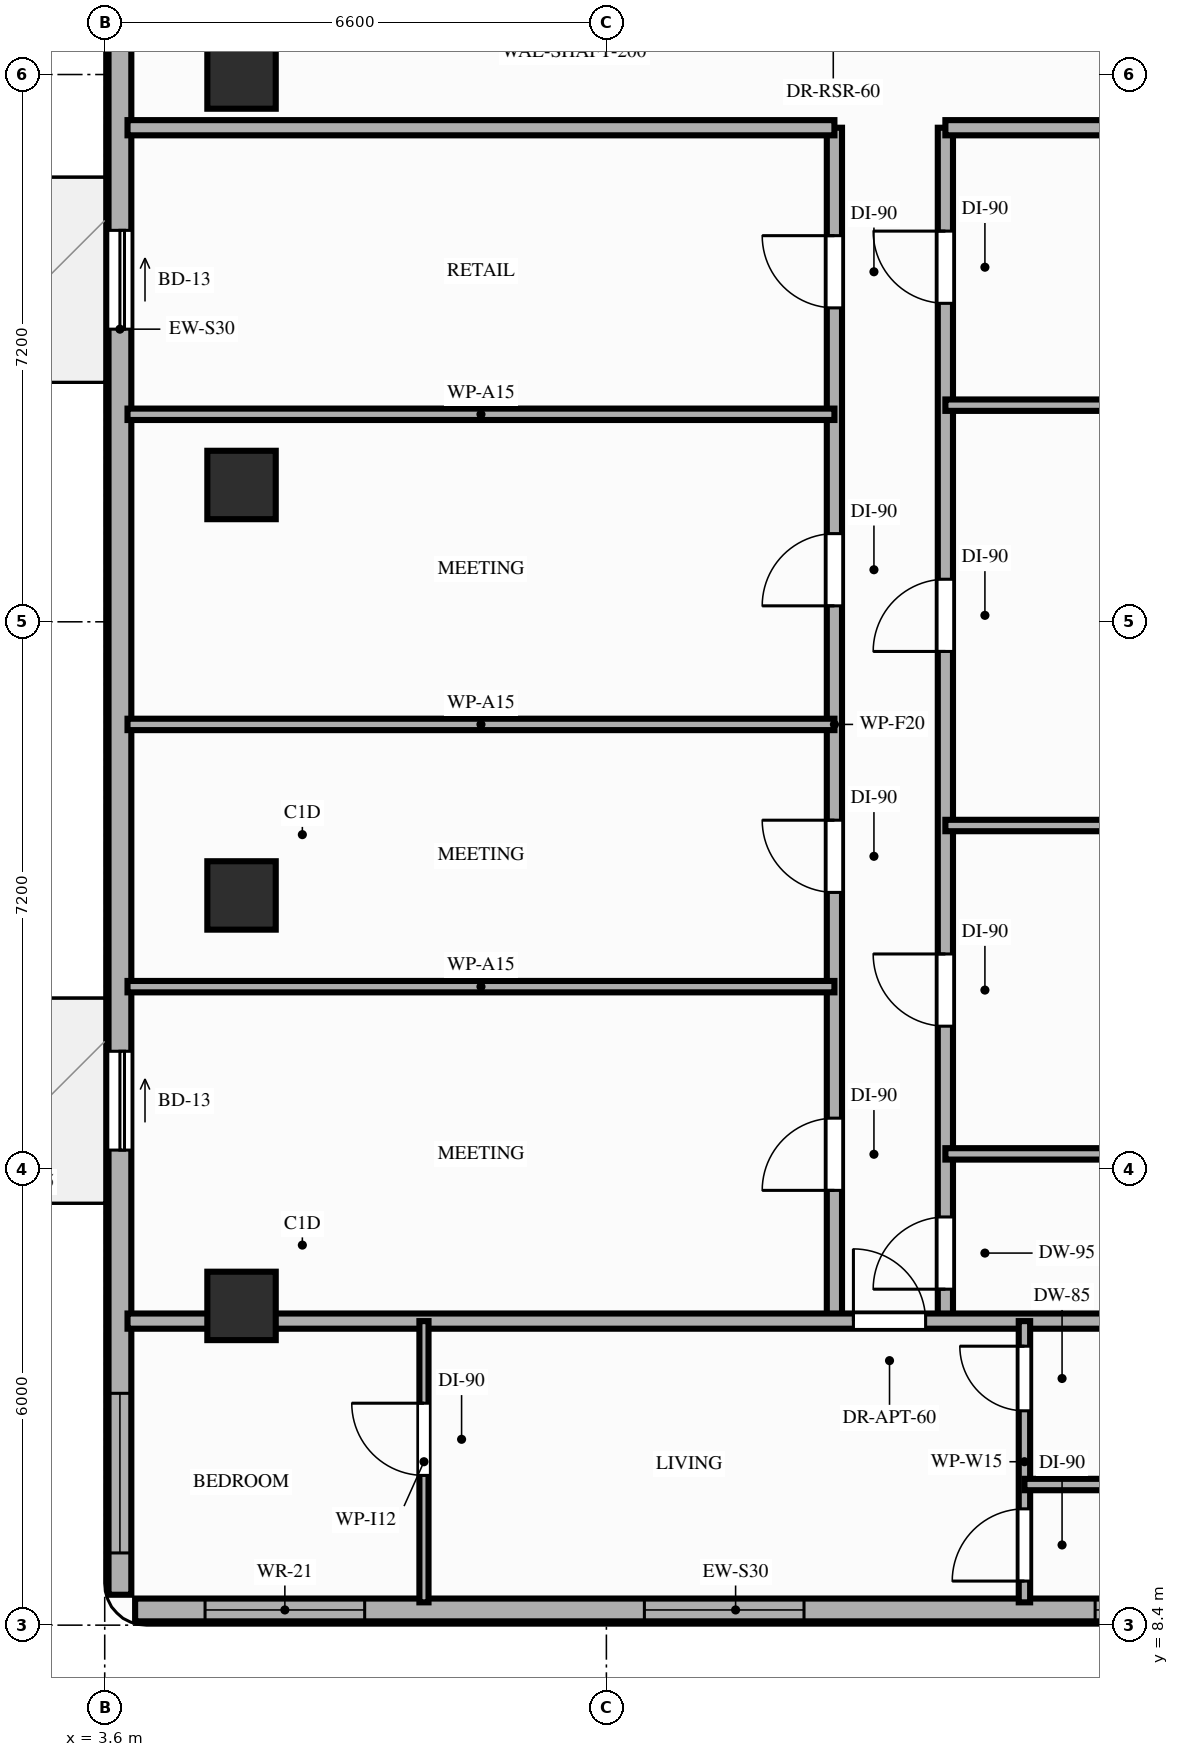
"""IFC4 building model, lengths in metres.
Left out: names, types, materials, properties, quantities, classifications, styles, units other than length and angle.
Written with IfcOpenShell. Run it as: python <this file> out.ifc"""

import sys

from ifc_helpers import new_model, si_unit, direction, frame, frame_2d, origin, origin_2d, place, context, subcontext, project, spatial, rectangle, extrude, element, fill, save


model = new_model("IFC4")
c1 = context("Model", 3, precision=1e-05, world=origin(), true_north=direction((0.0, 1.0)))
c2 = subcontext(c1, "Body", "Model", "MODEL_VIEW")
j1 = project(units=[si_unit("LENGTHUNIT", "METRE"), si_unit("PLANEANGLEUNIT", "RADIAN")], contexts=[c1])
p1 = place(None, origin())
s1 = spatial("IfcSite", under=j1, at=p1, CompositionType="ELEMENT")
p2 = place(p1, origin())
s2 = spatial("IfcBuilding", under=s1, at=p2, CompositionType="ELEMENT")
p3 = place(p2, frame((0.0, 0.0, 188.8)))
s3 = spatial("IfcBuildingStorey", under=s2, at=p3, CompositionType="ELEMENT", Elevation=188.8)
for number, where, z_axis, x_axis in (
    (1, (5.4, 12.6, 0.0), (0.0, 0.0, 1.0), (1.0, 0.0, 0.0)),
    (2, (5.4, 18.0, 0.0), (0.0, 0.0, 1.0), (1.0, 0.0, 0.0)),
    (3, (5.4, 23.4, 0.0), (0.0, 0.0, 1.0), (1.0, 0.0, 0.0)),
    (4, (5.4, 28.8, 0.0), (0.0, 0.0, 1.0), (1.0, 0.0, 0.0)),
):
    element("IfcColumn", number, at=place(p3, frame(where, z_axis=z_axis, x_axis=x_axis)), inside=s3, PredefinedType="COLUMN", context=c2, shape_type="SweptSolid", body=[
        extrude(rectangle(XDim=0.9, YDim=0.9, at=origin_2d()), origin(), (0.0, 0.0, 1.0), 3.2),
    ])
p4 = place(p3, frame((4.0, 8.6, 0.0), z_axis=(0.0, 0.0, 1.0), x_axis=(1.0, 0.0, 0.0)))
e5 = element("IfcWall", 5, at=p4, inside=s3, PredefinedType="STANDARD", context=c2, shape_type="SweptSolid", body=[
    extrude(rectangle(XDim=15.8, YDim=0.3, at=frame_2d((7.9, 0.0))), origin(), (0.0, 0.0, 1.0), 3.02),
])
p5 = place(p4, frame((0.92, 0.0, 0.85)))
e6 = element("IfcOpeningElement", 6, at=p5, cuts=e5, PredefinedType="OPENING", context=c2, shape_type="SweptSolid", body=[
    extrude(rectangle(XDim=2.1, YDim=1.8, at=frame_2d((1.05, 0.9))), frame((0.0, 0.16, 0.0), z_axis=(0.0, -1.0, 0.0), x_axis=(1.0, 0.0, 0.0)), (0.0, 0.0, 1.0), 0.32),
])
p6 = place(p4, frame((6.7, 0.0, 0.85)))
e7 = element("IfcOpeningElement", 7, at=p6, cuts=e5, PredefinedType="OPENING", context=c2, shape_type="SweptSolid", body=[
    extrude(rectangle(XDim=2.1, YDim=1.8, at=frame_2d((1.05, 0.9))), frame((0.0, 0.16, 0.0), z_axis=(0.0, -1.0, 0.0), x_axis=(1.0, 0.0, 0.0)), (0.0, 0.0, 1.0), 0.32),
])
p7 = place(p4, frame((12.63, 0.0, 0.85)))
e8 = element("IfcOpeningElement", 8, at=p7, cuts=e5, PredefinedType="OPENING", context=c2, shape_type="SweptSolid", body=[
    extrude(rectangle(XDim=2.1, YDim=1.8, at=frame_2d((1.05, 0.9))), frame((0.0, 0.16, 0.0), z_axis=(0.0, -1.0, 0.0), x_axis=(1.0, 0.0, 0.0)), (0.0, 0.0, 1.0), 0.32),
])
p8 = place(p3, frame((3.8, 42.1, 0.0), z_axis=(0.0, 0.0, 1.0), x_axis=(0.0, -1.0, 0.0)))
e9 = element("IfcWall", 9, at=p8, inside=s3, PredefinedType="STANDARD", context=c2, shape_type="SweptSolid", body=[
    extrude(rectangle(XDim=33.3, YDim=0.3, at=frame_2d((16.65, 0.0))), origin(), (0.0, 0.0, 1.0), 2.71),
])
p9 = place(p8, frame((26.15, 0.0, 0.0)))
e10 = element("IfcOpeningElement", 10, at=p9, cuts=e9, PredefinedType="OPENING", context=c2, shape_type="SweptSolid", body=[
    extrude(rectangle(XDim=1.3, YDim=2.08, at=frame_2d((0.65, 1.04))), frame((0.0, 0.16, 0.0), z_axis=(0.0, -1.0, 0.0), x_axis=(1.0, 0.0, 0.0)), (0.0, 0.0, 1.0), 0.32),
])
p10 = place(p8, frame((15.35, 0.0, 0.0)))
e11 = element("IfcOpeningElement", 11, at=p10, cuts=e9, PredefinedType="OPENING", context=c2, shape_type="SweptSolid", body=[
    extrude(rectangle(XDim=1.3, YDim=2.08, at=frame_2d((0.65, 1.04))), frame((0.0, 0.16, 0.0), z_axis=(0.0, -1.0, 0.0), x_axis=(1.0, 0.0, 0.0)), (0.0, 0.0, 1.0), 0.32),
])
p11 = place(p8, frame((30.65, 0.0, 0.85)))
e12 = element("IfcOpeningElement", 12, at=p11, cuts=e9, PredefinedType="OPENING", context=c2, shape_type="SweptSolid", body=[
    extrude(rectangle(XDim=2.1, YDim=1.61, at=frame_2d((1.05, 0.805))), frame((0.0, 0.16, 0.0), z_axis=(0.0, -1.0, 0.0), x_axis=(1.0, 0.0, 0.0)), (0.0, 0.0, 1.0), 0.32),
])
p12 = place(p8, frame((9.75, 0.0, 0.85)))
e13 = element("IfcOpeningElement", 13, at=p12, cuts=e9, PredefinedType="OPENING", context=c2, shape_type="SweptSolid", body=[
    extrude(rectangle(XDim=2.1, YDim=1.61, at=frame_2d((1.05, 0.805))), frame((0.0, 0.16, 0.0), z_axis=(0.0, -1.0, 0.0), x_axis=(1.0, 0.0, 0.0)), (0.0, 0.0, 1.0), 0.32),
])
p13 = place(p8, frame((3.65, 0.0, 0.85)))
e14 = element("IfcOpeningElement", 14, at=p13, cuts=e9, PredefinedType="OPENING", context=c2, shape_type="SweptSolid", body=[
    extrude(rectangle(XDim=2.1, YDim=1.61, at=frame_2d((1.05, 0.805))), frame((0.0, 0.16, 0.0), z_axis=(0.0, -1.0, 0.0), x_axis=(1.0, 0.0, 0.0)), (0.0, 0.0, 1.0), 0.32),
])
p14 = place(p3, frame((13.2, 12.4, 0.0), z_axis=(0.0, 0.0, 1.0), x_axis=(0.0, 1.0, 0.0)))
e15 = element("IfcWall", 15, at=p14, inside=s3, PredefinedType="PARTITIONING", context=c2, shape_type="SweptSolid", body=[
    extrude(rectangle(XDim=15.7, YDim=0.2, at=frame_2d((7.85, 0.0))), origin(), (0.0, 0.0, 1.0), 2.51),
])
p15 = place(p14, frame((1.72, 0.0, 0.0)))
e16 = element("IfcOpeningElement", 16, at=p15, cuts=e15, PredefinedType="OPENING", context=c2, shape_type="SweptSolid", body=[
    extrude(rectangle(XDim=0.95, YDim=2.15, at=frame_2d((0.475, 1.075))), frame((0.0, 0.11, 0.0), z_axis=(0.0, -1.0, 0.0), x_axis=(1.0, 0.0, 0.0)), (0.0, 0.0, 1.0), 0.22),
])
p16 = place(p14, frame((5.64, 0.0, 0.0)))
e17 = element("IfcOpeningElement", 17, at=p16, cuts=e15, PredefinedType="OPENING", context=c2, shape_type="SweptSolid", body=[
    extrude(rectangle(XDim=0.95, YDim=2.15, at=frame_2d((0.475, 1.075))), frame((0.0, 0.11, 0.0), z_axis=(0.0, -1.0, 0.0), x_axis=(1.0, 0.0, 0.0)), (0.0, 0.0, 1.0), 0.22),
])
p17 = place(p14, frame((9.41, 0.0, 0.0)))
e18 = element("IfcOpeningElement", 18, at=p17, cuts=e15, PredefinedType="OPENING", context=c2, shape_type="SweptSolid", body=[
    extrude(rectangle(XDim=0.95, YDim=2.15, at=frame_2d((0.475, 1.075))), frame((0.0, 0.11, 0.0), z_axis=(0.0, -1.0, 0.0), x_axis=(1.0, 0.0, 0.0)), (0.0, 0.0, 1.0), 0.22),
])
p18 = place(p14, frame((13.33, 0.0, 0.0)))
e19 = element("IfcOpeningElement", 19, at=p18, cuts=e15, PredefinedType="OPENING", context=c2, shape_type="SweptSolid", body=[
    extrude(rectangle(XDim=0.95, YDim=2.15, at=frame_2d((0.475, 1.075))), frame((0.0, 0.11, 0.0), z_axis=(0.0, -1.0, 0.0), x_axis=(1.0, 0.0, 0.0)), (0.0, 0.0, 1.0), 0.22),
])
p19 = place(p3, frame((14.66, 12.4, 0.0), z_axis=(0.0, 0.0, 1.0), x_axis=(0.0, 1.0, 0.0)))
e20 = element("IfcWall", 20, at=p19, inside=s3, PredefinedType="PARTITIONING", context=c2, shape_type="SweptSolid", body=[
    extrude(rectangle(XDim=15.7, YDim=0.2, at=frame_2d((7.85, 0.0))), origin(), (0.0, 0.0, 1.0), 2.51),
])
p20 = place(p19, frame((0.42, 0.0, 0.0)))
e21 = element("IfcOpeningElement", 21, at=p20, cuts=e20, PredefinedType="OPENING", context=c2, shape_type="SweptSolid", body=[
    extrude(rectangle(XDim=0.95, YDim=2.1, at=frame_2d((0.475, 1.05))), frame((0.0, 0.11, 0.0), z_axis=(0.0, -1.0, 0.0), x_axis=(1.0, 0.0, 0.0)), (0.0, 0.0, 1.0), 0.22),
])
p21 = place(p19, frame((3.88, 0.0, 0.0)))
e22 = element("IfcOpeningElement", 22, at=p21, cuts=e20, PredefinedType="OPENING", context=c2, shape_type="SweptSolid", body=[
    extrude(rectangle(XDim=0.95, YDim=2.15, at=frame_2d((0.475, 1.075))), frame((0.0, 0.11, 0.0), z_axis=(0.0, -1.0, 0.0), x_axis=(1.0, 0.0, 0.0)), (0.0, 0.0, 1.0), 0.22),
])
p22 = place(p19, frame((8.81, 0.0, 0.0)))
e23 = element("IfcOpeningElement", 23, at=p22, cuts=e20, PredefinedType="OPENING", context=c2, shape_type="SweptSolid", body=[
    extrude(rectangle(XDim=0.95, YDim=2.15, at=frame_2d((0.475, 1.075))), frame((0.0, 0.11, 0.0), z_axis=(0.0, -1.0, 0.0), x_axis=(1.0, 0.0, 0.0)), (0.0, 0.0, 1.0), 0.22),
])
p23 = place(p19, frame((13.39, 0.0, 0.0)))
e24 = element("IfcOpeningElement", 24, at=p23, cuts=e20, PredefinedType="OPENING", context=c2, shape_type="SweptSolid", body=[
    extrude(rectangle(XDim=0.95, YDim=2.15, at=frame_2d((0.475, 1.075))), frame((0.0, 0.11, 0.0), z_axis=(0.0, -1.0, 0.0), x_axis=(1.0, 0.0, 0.0)), (0.0, 0.0, 1.0), 0.22),
])
p24 = place(p3, frame((3.9, 12.4, 0.0), z_axis=(0.0, 0.0, 1.0), x_axis=(1.0, 0.0, 0.0)))
e25 = element("IfcWall", 25, at=p24, inside=s3, PredefinedType="PARTITIONING", context=c2, shape_type="SweptSolid", body=[
    extrude(rectangle(XDim=16.0, YDim=0.2, at=frame_2d((8.0, 0.0))), origin(), (0.0, 0.0, 1.0), 2.51),
])
p25 = place(p24, frame((9.55, 0.0, 0.0)))
e26 = element("IfcOpeningElement", 26, at=p25, cuts=e25, PredefinedType="OPENING", context=c2, shape_type="SweptSolid", body=[
    extrude(rectangle(XDim=0.95, YDim=2.15, at=frame_2d((0.475, 1.075))), frame((0.0, 0.11, 0.0), z_axis=(0.0, -1.0, 0.0), x_axis=(1.0, 0.0, 0.0)), (0.0, 0.0, 1.0), 0.22),
])
p26 = place(p3, frame((3.9, 28.1, 0.0), z_axis=(0.0, 0.0, 1.0), x_axis=(1.0, 0.0, 0.0)))
e27 = element("IfcWall", 27, at=p26, inside=s3, PredefinedType="PARTITIONING", context=c2, shape_type="SweptSolid", body=[
    extrude(rectangle(XDim=9.3, YDim=0.2, at=frame_2d((4.65, 0.0))), origin(), (0.0, 0.0, 1.0), 2.51),
])
p27 = place(p3, frame((14.66, 28.1, 0.0), z_axis=(0.0, 0.0, 1.0), x_axis=(1.0, 0.0, 0.0)))
e28 = element("IfcWall", 28, at=p27, inside=s3, PredefinedType="PARTITIONING", context=c2, shape_type="SweptSolid", body=[
    extrude(rectangle(XDim=5.24, YDim=0.2, at=frame_2d((2.62, 0.0))), origin(), (0.0, 0.0, 1.0), 2.51),
])
p28 = place(p3, frame((7.8, 8.7, 0.0), z_axis=(0.0, 0.0, 1.0), x_axis=(0.0, 1.0, 0.0)))
e29 = element("IfcWall", 29, at=p28, inside=s3, PredefinedType="PARTITIONING", context=c2, shape_type="SweptSolid", body=[
    extrude(rectangle(XDim=3.7, YDim=0.12, at=frame_2d((1.85, 0.0))), origin(), (0.0, 0.0, 1.0), 2.51),
])
p29 = place(p28, frame((1.67, 0.0, 0.0)))
e30 = element("IfcOpeningElement", 30, at=p29, cuts=e29, PredefinedType="OPENING", context=c2, shape_type="SweptSolid", body=[
    extrude(rectangle(XDim=0.95, YDim=2.15, at=frame_2d((0.475, 1.075))), frame((0.0, 0.07, 0.0), z_axis=(0.0, -1.0, 0.0), x_axis=(1.0, 0.0, 0.0)), (0.0, 0.0, 1.0), 0.14),
])
p30 = place(p3, frame((15.7, 8.7, 0.0), z_axis=(0.0, 0.0, 1.0), x_axis=(0.0, 1.0, 0.0)))
e31 = element("IfcWall", 31, at=p30, inside=s3, PredefinedType="PARTITIONING", context=c2, shape_type="SweptSolid", body=[
    extrude(rectangle(XDim=3.7, YDim=0.15, at=frame_2d((1.85, 0.0))), origin(), (0.0, 0.0, 1.0), 2.51),
])
p31 = place(p30, frame((0.28, 0.0, 0.0)))
e32 = element("IfcOpeningElement", 32, at=p31, cuts=e31, PredefinedType="OPENING", context=c2, shape_type="SweptSolid", body=[
    extrude(rectangle(XDim=0.95, YDim=2.15, at=frame_2d((0.475, 1.075))), frame((0.0, 0.085, 0.0), z_axis=(0.0, -1.0, 0.0), x_axis=(1.0, 0.0, 0.0)), (0.0, 0.0, 1.0), 0.17),
])
p32 = place(p30, frame((2.52, 0.0, 0.0)))
e33 = element("IfcOpeningElement", 33, at=p32, cuts=e31, PredefinedType="OPENING", context=c2, shape_type="SweptSolid", body=[
    extrude(rectangle(XDim=0.85, YDim=2.1, at=frame_2d((0.425, 1.05))), frame((0.0, 0.085, 0.0), z_axis=(0.0, -1.0, 0.0), x_axis=(1.0, 0.0, 0.0)), (0.0, 0.0, 1.0), 0.17),
])
p33 = place(p3, frame((15.7, 10.25, 0.0), z_axis=(0.0, 0.0, 1.0), x_axis=(1.0, 0.0, 0.0)))
e34 = element("IfcWall", 34, at=p33, inside=s3, PredefinedType="PARTITIONING", context=c2, shape_type="SweptSolid", body=[
    extrude(rectangle(XDim=4.2, YDim=0.15, at=frame_2d((2.1, 0.0))), origin(), (0.0, 0.0, 1.0), 3.02),
])
for number, where, z_axis, x_axis in (
    (35, (3.9, 16.8, 0.0), (0.0, 0.0, 1.0), (1.0, 0.0, 0.0)),
    (36, (3.9, 20.25, 0.0), (0.0, 0.0, 1.0), (1.0, 0.0, 0.0)),
    (37, (3.9, 24.33, 0.0), (0.0, 0.0, 1.0), (1.0, 0.0, 0.0)),
):
    element("IfcWall", number, at=place(p3, frame(where, z_axis=z_axis, x_axis=x_axis)), inside=s3, PredefinedType="PARTITIONING", context=c2, shape_type="SweptSolid", body=[
        extrude(rectangle(XDim=9.3, YDim=0.15, at=frame_2d((4.65, 0.0))), origin(), (0.0, 0.0, 1.0), 2.51),
    ])
for number, where, z_axis, x_axis in (
    (38, (14.66, 14.6, 0.0), (0.0, 0.0, 1.0), (1.0, 0.0, 0.0)),
    (39, (14.66, 18.92, 0.0), (0.0, 0.0, 1.0), (1.0, 0.0, 0.0)),
    (40, (14.66, 24.45, 0.0), (0.0, 0.0, 1.0), (1.0, 0.0, 0.0)),
):
    element("IfcWall", number, at=place(p3, frame(where, z_axis=z_axis, x_axis=x_axis)), inside=s3, PredefinedType="PARTITIONING", context=c2, shape_type="SweptSolid", body=[
        extrude(rectangle(XDim=5.24, YDim=0.15, at=frame_2d((2.62, 0.0))), origin(), (0.0, 0.0, 1.0), 2.51),
    ])
p34 = place(p9, origin())
e41 = element("IfcDoor", 41, at=p34, inside=s3, OperationType="SLIDING_TO_LEFT", PredefinedType="DOOR", context=c2, shape_type="SweptSolid", body=[
    extrude(rectangle(XDim=1.3, YDim=2.08, at=frame_2d((0.65, 1.04))), frame((0.0, 0.025, 0.0), z_axis=(0.0, -1.0, 0.0), x_axis=(1.0, 0.0, 0.0)), (0.0, 0.0, 1.0), 0.05),
])
fill(e10, e41)
p35 = place(p10, origin())
e42 = element("IfcDoor", 42, at=p35, inside=s3, OperationType="SLIDING_TO_LEFT", PredefinedType="DOOR", context=c2, shape_type="SweptSolid", body=[
    extrude(rectangle(XDim=1.3, YDim=2.08, at=frame_2d((0.65, 1.04))), frame((0.0, 0.025, 0.0), z_axis=(0.0, -1.0, 0.0), x_axis=(1.0, 0.0, 0.0)), (0.0, 0.0, 1.0), 0.05),
])
fill(e11, e42)
p36 = place(p5, origin())
e43 = element("IfcWindow", 43, at=p36, inside=s3, PartitioningType="SINGLE_PANEL", PredefinedType="WINDOW", context=c2, shape_type="SweptSolid", body=[
    extrude(rectangle(XDim=2.1, YDim=1.8, at=frame_2d((1.05, 0.9))), frame((0.0, 0.03, 0.0), z_axis=(0.0, -1.0, 0.0), x_axis=(1.0, 0.0, 0.0)), (0.0, 0.0, 1.0), 0.06),
])
fill(e6, e43)
p37 = place(p6, origin())
e44 = element("IfcWindow", 44, at=p37, inside=s3, PartitioningType="SINGLE_PANEL", PredefinedType="WINDOW", context=c2, shape_type="SweptSolid", body=[
    extrude(rectangle(XDim=2.1, YDim=1.8, at=frame_2d((1.05, 0.9))), frame((0.0, 0.03, 0.0), z_axis=(0.0, -1.0, 0.0), x_axis=(1.0, 0.0, 0.0)), (0.0, 0.0, 1.0), 0.06),
])
fill(e7, e44)
p38 = place(p7, origin())
e45 = element("IfcWindow", 45, at=p38, inside=s3, PartitioningType="SINGLE_PANEL", PredefinedType="WINDOW", context=c2, shape_type="SweptSolid", body=[
    extrude(rectangle(XDim=2.1, YDim=1.8, at=frame_2d((1.05, 0.9))), frame((0.0, 0.03, 0.0), z_axis=(0.0, -1.0, 0.0), x_axis=(1.0, 0.0, 0.0)), (0.0, 0.0, 1.0), 0.06),
])
fill(e8, e45)
p39 = place(p11, origin())
e46 = element("IfcWindow", 46, at=p39, inside=s3, PartitioningType="SINGLE_PANEL", PredefinedType="WINDOW", context=c2, shape_type="SweptSolid", body=[
    extrude(rectangle(XDim=2.1, YDim=1.61, at=frame_2d((1.05, 0.805))), frame((0.0, 0.03, 0.0), z_axis=(0.0, -1.0, 0.0), x_axis=(1.0, 0.0, 0.0)), (0.0, 0.0, 1.0), 0.06),
])
fill(e12, e46)
p40 = place(p25, origin())
e47 = element("IfcDoor", 47, at=p40, inside=s3, OperationType="SINGLE_SWING_LEFT", PredefinedType="DOOR", context=c2, shape_type="SweptSolid", body=[
    extrude(rectangle(XDim=0.95, YDim=2.15, at=frame_2d((0.475, 1.075))), frame((0.0, 0.025, 0.0), z_axis=(0.0, -1.0, 0.0), x_axis=(1.0, 0.0, 0.0)), (0.0, 0.0, 1.0), 0.05),
])
fill(e26, e47)
p41 = place(p29, origin())
e48 = element("IfcDoor", 48, at=p41, inside=s3, OperationType="SINGLE_SWING_RIGHT", PredefinedType="DOOR", context=c2, shape_type="SweptSolid", body=[
    extrude(rectangle(XDim=0.95, YDim=2.15, at=frame_2d((0.475, 1.075))), frame((0.0, 0.025, 0.0), z_axis=(0.0, -1.0, 0.0), x_axis=(1.0, 0.0, 0.0)), (0.0, 0.0, 1.0), 0.05),
])
fill(e30, e48)
p42 = place(p31, origin())
e49 = element("IfcDoor", 49, at=p42, inside=s3, OperationType="SINGLE_SWING_LEFT", PredefinedType="DOOR", context=c2, shape_type="SweptSolid", body=[
    extrude(rectangle(XDim=0.95, YDim=2.15, at=frame_2d((0.475, 1.075))), frame((0.0, 0.025, 0.0), z_axis=(0.0, -1.0, 0.0), x_axis=(1.0, 0.0, 0.0)), (0.0, 0.0, 1.0), 0.05),
])
fill(e32, e49)
p43 = place(p32, origin())
e50 = element("IfcDoor", 50, at=p43, inside=s3, OperationType="SINGLE_SWING_RIGHT", PredefinedType="DOOR", context=c2, shape_type="SweptSolid", body=[
    extrude(rectangle(XDim=0.85, YDim=2.1, at=frame_2d((0.425, 1.05))), frame((0.0, 0.025, 0.0), z_axis=(0.0, -1.0, 0.0), x_axis=(1.0, 0.0, 0.0)), (0.0, 0.0, 1.0), 0.05),
])
fill(e33, e50)
p44 = place(p15, origin())
e51 = element("IfcDoor", 51, at=p44, inside=s3, OperationType="SINGLE_SWING_LEFT", PredefinedType="DOOR", context=c2, shape_type="SweptSolid", body=[
    extrude(rectangle(XDim=0.95, YDim=2.15, at=frame_2d((0.475, 1.075))), frame((0.0, 0.025, 0.0), z_axis=(0.0, -1.0, 0.0), x_axis=(1.0, 0.0, 0.0)), (0.0, 0.0, 1.0), 0.05),
])
fill(e16, e51)
p45 = place(p16, origin())
e52 = element("IfcDoor", 52, at=p45, inside=s3, OperationType="SINGLE_SWING_RIGHT", PredefinedType="DOOR", context=c2, shape_type="SweptSolid", body=[
    extrude(rectangle(XDim=0.95, YDim=2.15, at=frame_2d((0.475, 1.075))), frame((0.0, 0.025, 0.0), z_axis=(0.0, -1.0, 0.0), x_axis=(1.0, 0.0, 0.0)), (0.0, 0.0, 1.0), 0.05),
])
fill(e17, e52)
p46 = place(p17, origin())
e53 = element("IfcDoor", 53, at=p46, inside=s3, OperationType="SINGLE_SWING_LEFT", PredefinedType="DOOR", context=c2, shape_type="SweptSolid", body=[
    extrude(rectangle(XDim=0.95, YDim=2.15, at=frame_2d((0.475, 1.075))), frame((0.0, 0.025, 0.0), z_axis=(0.0, -1.0, 0.0), x_axis=(1.0, 0.0, 0.0)), (0.0, 0.0, 1.0), 0.05),
])
fill(e18, e53)
p47 = place(p18, origin())
e54 = element("IfcDoor", 54, at=p47, inside=s3, OperationType="SINGLE_SWING_RIGHT", PredefinedType="DOOR", context=c2, shape_type="SweptSolid", body=[
    extrude(rectangle(XDim=0.95, YDim=2.15, at=frame_2d((0.475, 1.075))), frame((0.0, 0.025, 0.0), z_axis=(0.0, -1.0, 0.0), x_axis=(1.0, 0.0, 0.0)), (0.0, 0.0, 1.0), 0.05),
])
fill(e19, e54)
p48 = place(p20, origin())
e55 = element("IfcDoor", 55, at=p48, inside=s3, OperationType="SINGLE_SWING_LEFT", PredefinedType="DOOR", context=c2, shape_type="SweptSolid", body=[
    extrude(rectangle(XDim=0.95, YDim=2.1, at=frame_2d((0.475, 1.05))), frame((0.0, 0.025, 0.0), z_axis=(0.0, -1.0, 0.0), x_axis=(1.0, 0.0, 0.0)), (0.0, 0.0, 1.0), 0.05),
])
fill(e21, e55)
p49 = place(p21, origin())
e56 = element("IfcDoor", 56, at=p49, inside=s3, OperationType="SINGLE_SWING_RIGHT", PredefinedType="DOOR", context=c2, shape_type="SweptSolid", body=[
    extrude(rectangle(XDim=0.95, YDim=2.15, at=frame_2d((0.475, 1.075))), frame((0.0, 0.025, 0.0), z_axis=(0.0, -1.0, 0.0), x_axis=(1.0, 0.0, 0.0)), (0.0, 0.0, 1.0), 0.05),
])
fill(e22, e56)
p50 = place(p22, origin())
e57 = element("IfcDoor", 57, at=p50, inside=s3, OperationType="SINGLE_SWING_LEFT", PredefinedType="DOOR", context=c2, shape_type="SweptSolid", body=[
    extrude(rectangle(XDim=0.95, YDim=2.15, at=frame_2d((0.475, 1.075))), frame((0.0, 0.025, 0.0), z_axis=(0.0, -1.0, 0.0), x_axis=(1.0, 0.0, 0.0)), (0.0, 0.0, 1.0), 0.05),
])
fill(e23, e57)
p51 = place(p23, origin())
e58 = element("IfcDoor", 58, at=p51, inside=s3, OperationType="SINGLE_SWING_RIGHT", PredefinedType="DOOR", context=c2, shape_type="SweptSolid", body=[
    extrude(rectangle(XDim=0.95, YDim=2.15, at=frame_2d((0.475, 1.075))), frame((0.0, 0.025, 0.0), z_axis=(0.0, -1.0, 0.0), x_axis=(1.0, 0.0, 0.0)), (0.0, 0.0, 1.0), 0.05),
])
fill(e24, e58)
save(model, sys.argv[1])
